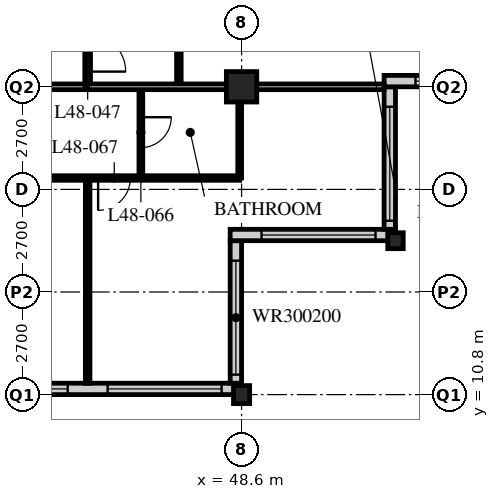
"""IFC4 building model, lengths in metres.
Left out: names, types, materials, properties, quantities, classifications, styles, units other than length and angle.
Written with IfcOpenShell. Run it as: python <this file> out.ifc"""

import sys

from ifc_helpers import new_model, si_unit, direction, frame, frame_2d, origin, origin_2d, place, context, subcontext, project, spatial, rectangle, hollow_rectangle, i_section, extrude, element, fill, save


model = new_model("IFC4")
c1 = context("Model", 3, precision=1e-05, world=origin(), true_north=direction((0.0, 1.0)))
c2 = subcontext(c1, "Body", "Model", "MODEL_VIEW")
j1 = project(units=[si_unit("LENGTHUNIT", "METRE"), si_unit("PLANEANGLEUNIT", "RADIAN")], contexts=[c1])
p1 = place(None, origin())
s1 = spatial("IfcSite", under=j1, at=p1, CompositionType="ELEMENT")
p2 = place(p1, origin())
s2 = spatial("IfcBuilding", under=s1, at=p2, CompositionType="ELEMENT")
p3 = place(p2, frame((0.0, 0.0, 188.4)))
s3 = spatial("IfcBuildingStorey", under=s2, at=p3, CompositionType="ELEMENT", Elevation=188.4)
p4 = place(p3, frame((48.6, 10.8, 0.0), z_axis=(0.0, 0.0, 1.0), x_axis=(1.0, 0.0, 0.0)))
e1 = element("IfcColumn", 1, at=p4, inside=s3, PredefinedType="COLUMN", context=c2, shape_type="SweptSolid", body=[
    extrude(i_section(OverallWidth=0.424, OverallDepth=0.475, WebThickness=0.048, FlangeThickness=0.077, FilletRadius=0.015, at=origin_2d()), origin(), (0.0, 0.0, 1.0), 3.6),
])
p5 = place(p3, frame((48.6, 18.9, 0.0), z_axis=(0.0, 0.0, 1.0), x_axis=(1.0, 0.0, 0.0)))
e2 = element("IfcColumn", 2, at=p5, inside=s3, PredefinedType="COLUMN", context=c2, shape_type="SweptSolid", body=[
    extrude(hollow_rectangle(XDim=0.8, YDim=0.8, WallThickness=0.08, at=origin_2d()), origin(), (0.0, 0.0, 1.0), 3.6),
])
p6 = place(p3, frame((52.65, 14.85, 0.0), z_axis=(0.0, 0.0, 1.0), x_axis=(1.0, 0.0, 0.0)))
e3 = element("IfcColumn", 3, at=p6, inside=s3, PredefinedType="COLUMN", context=c2, shape_type="SweptSolid", body=[
    extrude(i_section(OverallWidth=0.407, OverallDepth=0.419, WebThickness=0.031, FlangeThickness=0.049, FilletRadius=0.015, at=origin_2d()), origin(), (0.0, 0.0, 1.0), 3.6),
])
p7 = place(p3, frame((8.4, 10.95, 0.0), z_axis=(0.0, 0.0, 1.0), x_axis=(1.0, 0.0, 0.0)))
e4 = element("IfcWall", 4, at=p7, inside=s3, PredefinedType="SOLIDWALL", context=c2, shape_type="SweptSolid", body=[
    extrude(rectangle(XDim=40.2, YDim=0.3, at=frame_2d((20.1, 0.0))), origin(), (0.0, 0.0, 1.0), 3.39),
])
p8 = place(p7, frame((0.225, 0.0, 0.6)))
e5 = element("IfcOpeningElement", 5, at=p8, cuts=e4, PredefinedType="OPENING", context=c2, shape_type="SweptSolid", body=[
    extrude(rectangle(XDim=3.0, YDim=2.4, at=frame_2d((1.5, 1.2))), frame((0.0, 0.16, 0.0), z_axis=(0.0, -1.0, 0.0), x_axis=(1.0, 0.0, 0.0)), (0.0, 0.0, 1.0), 0.32),
])
p9 = place(p7, frame((4.275, 0.0, 0.6)))
e6 = element("IfcOpeningElement", 6, at=p9, cuts=e4, PredefinedType="OPENING", context=c2, shape_type="SweptSolid", body=[
    extrude(rectangle(XDim=3.0, YDim=2.4, at=frame_2d((1.5, 1.2))), frame((0.0, 0.16, 0.0), z_axis=(0.0, -1.0, 0.0), x_axis=(1.0, 0.0, 0.0)), (0.0, 0.0, 1.0), 0.32),
])
p10 = place(p7, frame((8.325, 0.0, 0.6)))
e7 = element("IfcOpeningElement", 7, at=p10, cuts=e4, PredefinedType="OPENING", context=c2, shape_type="SweptSolid", body=[
    extrude(rectangle(XDim=3.0, YDim=2.4, at=frame_2d((1.5, 1.2))), frame((0.0, 0.16, 0.0), z_axis=(0.0, -1.0, 0.0), x_axis=(1.0, 0.0, 0.0)), (0.0, 0.0, 1.0), 0.32),
])
p11 = place(p7, frame((12.375, 0.0, 0.6)))
e8 = element("IfcOpeningElement", 8, at=p11, cuts=e4, PredefinedType="OPENING", context=c2, shape_type="SweptSolid", body=[
    extrude(rectangle(XDim=3.0, YDim=2.4, at=frame_2d((1.5, 1.2))), frame((0.0, 0.16, 0.0), z_axis=(0.0, -1.0, 0.0), x_axis=(1.0, 0.0, 0.0)), (0.0, 0.0, 1.0), 0.32),
])
p12 = place(p7, frame((16.425, 0.0, 0.6)))
e9 = element("IfcOpeningElement", 9, at=p12, cuts=e4, PredefinedType="OPENING", context=c2, shape_type="SweptSolid", body=[
    extrude(rectangle(XDim=3.0, YDim=2.4, at=frame_2d((1.5, 1.2))), frame((0.0, 0.16, 0.0), z_axis=(0.0, -1.0, 0.0), x_axis=(1.0, 0.0, 0.0)), (0.0, 0.0, 1.0), 0.32),
])
p13 = place(p7, frame((20.475, 0.0, 0.6)))
e10 = element("IfcOpeningElement", 10, at=p13, cuts=e4, PredefinedType="OPENING", context=c2, shape_type="SweptSolid", body=[
    extrude(rectangle(XDim=3.0, YDim=2.4, at=frame_2d((1.5, 1.2))), frame((0.0, 0.16, 0.0), z_axis=(0.0, -1.0, 0.0), x_axis=(1.0, 0.0, 0.0)), (0.0, 0.0, 1.0), 0.32),
])
p14 = place(p7, frame((24.525, 0.0, 0.6)))
e11 = element("IfcOpeningElement", 11, at=p14, cuts=e4, PredefinedType="OPENING", context=c2, shape_type="SweptSolid", body=[
    extrude(rectangle(XDim=3.0, YDim=2.4, at=frame_2d((1.5, 1.2))), frame((0.0, 0.16, 0.0), z_axis=(0.0, -1.0, 0.0), x_axis=(1.0, 0.0, 0.0)), (0.0, 0.0, 1.0), 0.32),
])
p15 = place(p7, frame((28.575, 0.0, 0.6)))
e12 = element("IfcOpeningElement", 12, at=p15, cuts=e4, PredefinedType="OPENING", context=c2, shape_type="SweptSolid", body=[
    extrude(rectangle(XDim=3.0, YDim=2.4, at=frame_2d((1.5, 1.2))), frame((0.0, 0.16, 0.0), z_axis=(0.0, -1.0, 0.0), x_axis=(1.0, 0.0, 0.0)), (0.0, 0.0, 1.0), 0.32),
])
p16 = place(p7, frame((32.625, 0.0, 0.6)))
e13 = element("IfcOpeningElement", 13, at=p16, cuts=e4, PredefinedType="OPENING", context=c2, shape_type="SweptSolid", body=[
    extrude(rectangle(XDim=3.0, YDim=2.4, at=frame_2d((1.5, 1.2))), frame((0.0, 0.16, 0.0), z_axis=(0.0, -1.0, 0.0), x_axis=(1.0, 0.0, 0.0)), (0.0, 0.0, 1.0), 0.32),
])
p17 = place(p7, frame((36.675, 0.0, 0.6)))
e14 = element("IfcOpeningElement", 14, at=p17, cuts=e4, PredefinedType="OPENING", context=c2, shape_type="SweptSolid", body=[
    extrude(rectangle(XDim=3.0, YDim=2.4, at=frame_2d((1.5, 1.2))), frame((0.0, 0.16, 0.0), z_axis=(0.0, -1.0, 0.0), x_axis=(1.0, 0.0, 0.0)), (0.0, 0.0, 1.0), 0.32),
])
p18 = place(p3, frame((48.45, 11.1, 0.0), z_axis=(0.0, 0.0, 1.0), x_axis=(0.0, 1.0, 0.0)))
e15 = element("IfcWall", 15, at=p18, inside=s3, PredefinedType="SOLIDWALL", context=c2, shape_type="SweptSolid", body=[
    extrude(rectangle(XDim=3.75, YDim=0.3, at=frame_2d((1.875, 0.0))), origin(), (0.0, 0.0, 1.0), 3.39),
])
p19 = place(p18, frame((0.225, 0.0, 0.6)))
e16 = element("IfcOpeningElement", 16, at=p19, cuts=e15, PredefinedType="OPENING", context=c2, shape_type="SweptSolid", body=[
    extrude(rectangle(XDim=3.0, YDim=2.0, at=frame_2d((1.5, 1.0))), frame((0.0, 0.16, 0.0), z_axis=(0.0, -1.0, 0.0), x_axis=(1.0, 0.0, 0.0)), (0.0, 0.0, 1.0), 0.32),
])
p20 = place(p3, frame((48.3, 15.0, 0.0), z_axis=(0.0, 0.0, 1.0), x_axis=(1.0, 0.0, 0.0)))
e17 = element("IfcWall", 17, at=p20, inside=s3, PredefinedType="SOLIDWALL", context=c2, shape_type="SweptSolid", body=[
    extrude(rectangle(XDim=4.35, YDim=0.3, at=frame_2d((2.175, 0.0))), origin(), (0.0, 0.0, 1.0), 3.39),
])
p21 = place(p20, frame((0.825, 0.0, 0.6)))
e18 = element("IfcOpeningElement", 18, at=p21, cuts=e17, PredefinedType="OPENING", context=c2, shape_type="SweptSolid", body=[
    extrude(rectangle(XDim=3.0, YDim=2.0, at=frame_2d((1.5, 1.0))), frame((0.0, 0.16, 0.0), z_axis=(0.0, -1.0, 0.0), x_axis=(1.0, 0.0, 0.0)), (0.0, 0.0, 1.0), 0.32),
])
p22 = place(p3, frame((52.5, 15.15, 0.0), z_axis=(0.0, 0.0, 1.0), x_axis=(0.0, 1.0, 0.0)))
e19 = element("IfcWall", 19, at=p22, inside=s3, PredefinedType="SOLIDWALL", context=c2, shape_type="SweptSolid", body=[
    extrude(rectangle(XDim=3.75, YDim=0.3, at=frame_2d((1.875, 0.0))), origin(), (0.0, 0.0, 1.0), 3.39),
])
p23 = place(p22, frame((0.225, 0.0, 0.6)))
e20 = element("IfcOpeningElement", 20, at=p23, cuts=e19, PredefinedType="OPENING", context=c2, shape_type="SweptSolid", body=[
    extrude(rectangle(XDim=3.0, YDim=2.0, at=frame_2d((1.5, 1.0))), frame((0.0, 0.16, 0.0), z_axis=(0.0, -1.0, 0.0), x_axis=(1.0, 0.0, 0.0)), (0.0, 0.0, 1.0), 0.32),
])
p24 = place(p3, frame((52.35, 19.05, 0.0), z_axis=(0.0, 0.0, 1.0), x_axis=(1.0, 0.0, 0.0)))
e21 = element("IfcWall", 21, at=p24, inside=s3, PredefinedType="SOLIDWALL", context=c2, shape_type="SweptSolid", body=[
    extrude(rectangle(XDim=4.35, YDim=0.3, at=frame_2d((2.175, 0.0))), origin(), (0.0, 0.0, 1.0), 3.39),
])
p25 = place(p24, frame((0.825, 0.0, 0.6)))
e22 = element("IfcOpeningElement", 22, at=p25, cuts=e21, PredefinedType="OPENING", context=c2, shape_type="SweptSolid", body=[
    extrude(rectangle(XDim=3.0, YDim=2.0, at=frame_2d((1.5, 1.0))), frame((0.0, 0.16, 0.0), z_axis=(0.0, -1.0, 0.0), x_axis=(1.0, 0.0, 0.0)), (0.0, 0.0, 1.0), 0.32),
])
p26 = place(p3, frame((12.15, 18.9, 0.0), z_axis=(0.0, 0.0, 1.0), x_axis=(1.0, 0.0, 0.0)))
e23 = element("IfcWall", 23, at=p26, inside=s3, PredefinedType="PARTITIONING", context=c2, shape_type="SweptSolid", body=[
    extrude(rectangle(XDim=32.4, YDim=0.15, at=frame_2d((16.2, 0.0))), origin(), (0.0, 0.0, 1.0), 2.778),
])
p27 = place(p26, frame((4.95, 0.0, 0.0)))
e24 = element("IfcOpeningElement", 24, at=p27, cuts=e23, PredefinedType="OPENING", context=c2, shape_type="SweptSolid", body=[
    extrude(rectangle(XDim=1.0, YDim=2.1, at=frame_2d((0.5, 1.05))), frame((0.0, 0.085, 0.0), z_axis=(0.0, -1.0, 0.0), x_axis=(1.0, 0.0, 0.0)), (0.0, 0.0, 1.0), 0.17),
])
p28 = place(p26, frame((13.05, 0.0, 0.0)))
e25 = element("IfcOpeningElement", 25, at=p28, cuts=e23, PredefinedType="OPENING", context=c2, shape_type="SweptSolid", body=[
    extrude(rectangle(XDim=1.0, YDim=2.1, at=frame_2d((0.5, 1.05))), frame((0.0, 0.085, 0.0), z_axis=(0.0, -1.0, 0.0), x_axis=(1.0, 0.0, 0.0)), (0.0, 0.0, 1.0), 0.17),
])
p29 = place(p26, frame((21.15, 0.0, 0.0)))
e26 = element("IfcOpeningElement", 26, at=p29, cuts=e23, PredefinedType="OPENING", context=c2, shape_type="SweptSolid", body=[
    extrude(rectangle(XDim=1.0, YDim=2.1, at=frame_2d((0.5, 1.05))), frame((0.0, 0.085, 0.0), z_axis=(0.0, -1.0, 0.0), x_axis=(1.0, 0.0, 0.0)), (0.0, 0.0, 1.0), 0.17),
])
p30 = place(p26, frame((1.525, 0.0, 0.0)))
e27 = element("IfcOpeningElement", 27, at=p30, cuts=e23, PredefinedType="OPENING", context=c2, shape_type="SweptSolid", body=[
    extrude(rectangle(XDim=1.0, YDim=2.1, at=frame_2d((0.5, 1.05))), frame((0.0, 0.085, 0.0), z_axis=(0.0, -1.0, 0.0), x_axis=(1.0, 0.0, 0.0)), (0.0, 0.0, 1.0), 0.17),
])
p31 = place(p26, frame((29.875, 0.0, 0.0)))
e28 = element("IfcOpeningElement", 28, at=p31, cuts=e23, PredefinedType="OPENING", context=c2, shape_type="SweptSolid", body=[
    extrude(rectangle(XDim=1.0, YDim=2.1, at=frame_2d((0.5, 1.05))), frame((0.0, 0.085, 0.0), z_axis=(0.0, -1.0, 0.0), x_axis=(1.0, 0.0, 0.0)), (0.0, 0.0, 1.0), 0.17),
])
p32 = place(p3, frame((44.55, 18.9, 0.0), z_axis=(0.0, 0.0, 1.0), x_axis=(0.0, 1.0, 0.0)))
e29 = element("IfcWall", 29, at=p32, inside=s3, PredefinedType="PARTITIONING", context=c2, shape_type="SweptSolid", body=[
    extrude(rectangle(XDim=28.35, YDim=0.15, at=frame_2d((14.175, 0.0))), origin(), (0.0, 0.0, 1.0), 3.39),
])
p33 = place(p32, frame((0.4, 0.0, 0.0)))
e30 = element("IfcOpeningElement", 30, at=p33, cuts=e29, PredefinedType="OPENING", context=c2, shape_type="SweptSolid", body=[
    extrude(rectangle(XDim=1.0, YDim=2.1, at=frame_2d((0.5, 1.05))), frame((0.0, 0.085, 0.0), z_axis=(0.0, -1.0, 0.0), x_axis=(1.0, 0.0, 0.0)), (0.0, 0.0, 1.0), 0.17),
])
p34 = place(p32, frame((10.45, 0.0, 0.0)))
e31 = element("IfcOpeningElement", 31, at=p34, cuts=e29, PredefinedType="OPENING", context=c2, shape_type="SweptSolid", body=[
    extrude(rectangle(XDim=1.0, YDim=2.1, at=frame_2d((0.5, 1.05))), frame((0.0, 0.085, 0.0), z_axis=(0.0, -1.0, 0.0), x_axis=(1.0, 0.0, 0.0)), (0.0, 0.0, 1.0), 0.17),
])
p35 = place(p32, frame((14.5, 0.0, 0.0)))
e32 = element("IfcOpeningElement", 32, at=p35, cuts=e29, PredefinedType="OPENING", context=c2, shape_type="SweptSolid", body=[
    extrude(rectangle(XDim=1.0, YDim=2.1, at=frame_2d((0.5, 1.05))), frame((0.0, 0.085, 0.0), z_axis=(0.0, -1.0, 0.0), x_axis=(1.0, 0.0, 0.0)), (0.0, 0.0, 1.0), 0.17),
])
p36 = place(p32, frame((16.6, 0.0, 0.0)))
e33 = element("IfcOpeningElement", 33, at=p36, cuts=e29, PredefinedType="OPENING", context=c2, shape_type="SweptSolid", body=[
    extrude(rectangle(XDim=1.0, YDim=2.1, at=frame_2d((0.5, 1.05))), frame((0.0, 0.085, 0.0), z_axis=(0.0, -1.0, 0.0), x_axis=(1.0, 0.0, 0.0)), (0.0, 0.0, 1.0), 0.17),
])
p37 = place(p32, frame((26.65, 0.0, 0.0)))
e34 = element("IfcOpeningElement", 34, at=p37, cuts=e29, PredefinedType="OPENING", context=c2, shape_type="SweptSolid", body=[
    extrude(rectangle(XDim=1.0, YDim=2.1, at=frame_2d((0.5, 1.05))), frame((0.0, 0.085, 0.0), z_axis=(0.0, -1.0, 0.0), x_axis=(1.0, 0.0, 0.0)), (0.0, 0.0, 1.0), 0.17),
])
p38 = place(p3, frame((46.95, 18.9, 0.0), z_axis=(0.0, 0.0, 1.0), x_axis=(0.0, 1.0, 0.0)))
e35 = element("IfcWall", 35, at=p38, inside=s3, PredefinedType="PARTITIONING", context=c2, shape_type="SweptSolid", body=[
    extrude(rectangle(XDim=8.1, YDim=0.12, at=frame_2d((4.05, 0.0))), origin(), (0.0, 0.0, 1.0), 3.39),
])
p39 = place(p38, frame((0.975, 0.0, 0.0)))
e36 = element("IfcOpeningElement", 36, at=p39, cuts=e35, PredefinedType="OPENING", context=c2, shape_type="SweptSolid", body=[
    extrude(rectangle(XDim=0.85, YDim=2.1, at=frame_2d((0.425, 1.05))), frame((0.0, 0.07, 0.0), z_axis=(0.0, -1.0, 0.0), x_axis=(1.0, 0.0, 0.0)), (0.0, 0.0, 1.0), 0.14),
])
p40 = place(p38, frame((4.375, 0.0, 0.0)))
e37 = element("IfcOpeningElement", 37, at=p40, cuts=e35, PredefinedType="OPENING", context=c2, shape_type="SweptSolid", body=[
    extrude(rectangle(XDim=0.85, YDim=2.1, at=frame_2d((0.425, 1.05))), frame((0.0, 0.07, 0.0), z_axis=(0.0, -1.0, 0.0), x_axis=(1.0, 0.0, 0.0)), (0.0, 0.0, 1.0), 0.14),
])
p41 = place(p3, frame((8.15, 16.5, 0.0), z_axis=(0.0, 0.0, 1.0), x_axis=(1.0, 0.0, 0.0)))
e38 = element("IfcWall", 38, at=p41, inside=s3, PredefinedType="PARTITIONING", context=c2, shape_type="SweptSolid", body=[
    extrude(rectangle(XDim=40.4, YDim=0.12, at=frame_2d((20.2, 0.0))), origin(), (0.0, 0.0, 1.0), 3.39),
])
p42 = place(p41, frame((9.025, 0.0, 0.0)))
e39 = element("IfcOpeningElement", 39, at=p42, cuts=e38, PredefinedType="OPENING", context=c2, shape_type="SweptSolid", body=[
    extrude(rectangle(XDim=0.85, YDim=2.1, at=frame_2d((0.425, 1.05))), frame((0.0, 0.07, 0.0), z_axis=(0.0, -1.0, 0.0), x_axis=(1.0, 0.0, 0.0)), (0.0, 0.0, 1.0), 0.14),
])
p43 = place(p41, frame((12.425, 0.0, 0.0)))
e40 = element("IfcOpeningElement", 40, at=p43, cuts=e38, PredefinedType="OPENING", context=c2, shape_type="SweptSolid", body=[
    extrude(rectangle(XDim=0.85, YDim=2.1, at=frame_2d((0.425, 1.05))), frame((0.0, 0.07, 0.0), z_axis=(0.0, -1.0, 0.0), x_axis=(1.0, 0.0, 0.0)), (0.0, 0.0, 1.0), 0.14),
])
p44 = place(p41, frame((17.125, 0.0, 0.0)))
e41 = element("IfcOpeningElement", 41, at=p44, cuts=e38, PredefinedType="OPENING", context=c2, shape_type="SweptSolid", body=[
    extrude(rectangle(XDim=0.85, YDim=2.1, at=frame_2d((0.425, 1.05))), frame((0.0, 0.07, 0.0), z_axis=(0.0, -1.0, 0.0), x_axis=(1.0, 0.0, 0.0)), (0.0, 0.0, 1.0), 0.14),
])
p45 = place(p41, frame((20.525, 0.0, 0.0)))
e42 = element("IfcOpeningElement", 42, at=p45, cuts=e38, PredefinedType="OPENING", context=c2, shape_type="SweptSolid", body=[
    extrude(rectangle(XDim=0.85, YDim=2.1, at=frame_2d((0.425, 1.05))), frame((0.0, 0.07, 0.0), z_axis=(0.0, -1.0, 0.0), x_axis=(1.0, 0.0, 0.0)), (0.0, 0.0, 1.0), 0.14),
])
p46 = place(p41, frame((25.225, 0.0, 0.0)))
e43 = element("IfcOpeningElement", 43, at=p46, cuts=e38, PredefinedType="OPENING", context=c2, shape_type="SweptSolid", body=[
    extrude(rectangle(XDim=0.85, YDim=2.1, at=frame_2d((0.425, 1.05))), frame((0.0, 0.07, 0.0), z_axis=(0.0, -1.0, 0.0), x_axis=(1.0, 0.0, 0.0)), (0.0, 0.0, 1.0), 0.14),
])
p47 = place(p41, frame((28.625, 0.0, 0.0)))
e44 = element("IfcOpeningElement", 44, at=p47, cuts=e38, PredefinedType="OPENING", context=c2, shape_type="SweptSolid", body=[
    extrude(rectangle(XDim=0.85, YDim=2.1, at=frame_2d((0.425, 1.05))), frame((0.0, 0.07, 0.0), z_axis=(0.0, -1.0, 0.0), x_axis=(1.0, 0.0, 0.0)), (0.0, 0.0, 1.0), 0.14),
])
p48 = place(p41, frame((6.725, 0.0, 0.0)))
e45 = element("IfcOpeningElement", 45, at=p48, cuts=e38, PredefinedType="OPENING", context=c2, shape_type="SweptSolid", body=[
    extrude(rectangle(XDim=0.85, YDim=2.1, at=frame_2d((0.425, 1.05))), frame((0.0, 0.07, 0.0), z_axis=(0.0, -1.0, 0.0), x_axis=(1.0, 0.0, 0.0)), (0.0, 0.0, 1.0), 0.14),
])
p49 = place(p41, frame((2.875, 0.0, 0.0)))
e46 = element("IfcOpeningElement", 46, at=p49, cuts=e38, PredefinedType="OPENING", context=c2, shape_type="SweptSolid", body=[
    extrude(rectangle(XDim=0.85, YDim=2.1, at=frame_2d((0.425, 1.05))), frame((0.0, 0.07, 0.0), z_axis=(0.0, -1.0, 0.0), x_axis=(1.0, 0.0, 0.0)), (0.0, 0.0, 1.0), 0.14),
])
p50 = place(p41, frame((32.825, 0.0, 0.0)))
e47 = element("IfcOpeningElement", 47, at=p50, cuts=e38, PredefinedType="OPENING", context=c2, shape_type="SweptSolid", body=[
    extrude(rectangle(XDim=0.85, YDim=2.1, at=frame_2d((0.425, 1.05))), frame((0.0, 0.07, 0.0), z_axis=(0.0, -1.0, 0.0), x_axis=(1.0, 0.0, 0.0)), (0.0, 0.0, 1.0), 0.14),
])
p51 = place(p41, frame((36.675, 0.0, 0.0)))
e48 = element("IfcOpeningElement", 48, at=p51, cuts=e38, PredefinedType="OPENING", context=c2, shape_type="SweptSolid", body=[
    extrude(rectangle(XDim=0.85, YDim=2.1, at=frame_2d((0.425, 1.05))), frame((0.0, 0.07, 0.0), z_axis=(0.0, -1.0, 0.0), x_axis=(1.0, 0.0, 0.0)), (0.0, 0.0, 1.0), 0.14),
])
p52 = place(p3, frame((45.95, 18.9, 0.0), z_axis=(0.0, 0.0, 1.0), x_axis=(0.0, -1.0, 0.0)))
e49 = element("IfcWall", 49, at=p52, inside=s3, PredefinedType="PARTITIONING", context=c2, shape_type="SweptSolid", body=[
    extrude(rectangle(XDim=2.4, YDim=0.1, at=frame_2d((1.2, 0.0))), origin(), (0.0, 0.0, 1.0), 3.39),
])
p53 = place(p52, frame((0.8, 0.0, 0.0)))
e50 = element("IfcOpeningElement", 50, at=p53, cuts=e49, PredefinedType="OPENING", context=c2, shape_type="SweptSolid", body=[
    extrude(rectangle(XDim=0.8, YDim=2.1, at=frame_2d((0.4, 1.05))), frame((0.0, 0.06, 0.0), z_axis=(0.0, -1.0, 0.0), x_axis=(1.0, 0.0, 0.0)), (0.0, 0.0, 1.0), 0.12),
])
p54 = place(p3, frame((48.55, 18.9, 0.0), z_axis=(0.0, 0.0, 1.0), x_axis=(0.0, -1.0, 0.0)))
e51 = element("IfcWall", 51, at=p54, inside=s3, PredefinedType="PARTITIONING", context=c2, shape_type="SweptSolid", body=[
    extrude(rectangle(XDim=2.4, YDim=0.1, at=frame_2d((1.2, 0.0))), origin(), (0.0, 0.0, 1.0), 2.778),
])
p55 = place(p3, frame((44.55, 16.5, 0.0), z_axis=(0.0, 0.0, 1.0), x_axis=(0.0, -1.0, 0.0)))
e52 = element("IfcWall", 52, at=p55, inside=s3, PredefinedType="PARTITIONING", context=c2, shape_type="SweptSolid", body=[
    extrude(rectangle(XDim=5.4, YDim=0.12, at=frame_2d((2.7, 0.0))), origin(), (0.0, 0.0, 1.0), 3.39),
])
p56 = place(p3, frame((44.55, 18.9, 0.0), z_axis=(0.0, 0.0, 1.0), x_axis=(1.0, 0.0, 0.0)))
e53 = element("IfcWall", 53, at=p56, inside=s3, PredefinedType="PARTITIONING", context=c2, shape_type="SweptSolid", body=[
    extrude(rectangle(XDim=7.8, YDim=0.15, at=frame_2d((3.9, 0.0))), origin(), (0.0, 0.0, 1.0), 2.778),
])
p57 = place(p16, origin())
e54 = element("IfcWindow", 54, at=p57, inside=s3, PartitioningType="SINGLE_PANEL", PredefinedType="WINDOW", context=c2, shape_type="SweptSolid", body=[
    extrude(rectangle(XDim=3.0, YDim=2.4, at=frame_2d((1.5, 1.2))), frame((0.0, 0.03, 0.0), z_axis=(0.0, -1.0, 0.0), x_axis=(1.0, 0.0, 0.0)), (0.0, 0.0, 1.0), 0.06),
])
fill(e13, e54)
p58 = place(p17, origin())
e55 = element("IfcWindow", 55, at=p58, inside=s3, PartitioningType="SINGLE_PANEL", PredefinedType="WINDOW", context=c2, shape_type="SweptSolid", body=[
    extrude(rectangle(XDim=3.0, YDim=2.4, at=frame_2d((1.5, 1.2))), frame((0.0, 0.03, 0.0), z_axis=(0.0, -1.0, 0.0), x_axis=(1.0, 0.0, 0.0)), (0.0, 0.0, 1.0), 0.06),
])
fill(e14, e55)
p59 = place(p19, origin())
e56 = element("IfcWindow", 56, at=p59, inside=s3, PartitioningType="SINGLE_PANEL", PredefinedType="WINDOW", context=c2, shape_type="SweptSolid", body=[
    extrude(rectangle(XDim=3.0, YDim=2.0, at=frame_2d((1.5, 1.0))), frame((0.0, 0.03, 0.0), z_axis=(0.0, -1.0, 0.0), x_axis=(1.0, 0.0, 0.0)), (0.0, 0.0, 1.0), 0.06),
])
fill(e16, e56)
p60 = place(p21, origin())
e57 = element("IfcWindow", 57, at=p60, inside=s3, PartitioningType="SINGLE_PANEL", PredefinedType="WINDOW", context=c2, shape_type="SweptSolid", body=[
    extrude(rectangle(XDim=3.0, YDim=2.0, at=frame_2d((1.5, 1.0))), frame((0.0, 0.03, 0.0), z_axis=(0.0, -1.0, 0.0), x_axis=(1.0, 0.0, 0.0)), (0.0, 0.0, 1.0), 0.06),
])
fill(e18, e57)
p61 = place(p23, origin())
e58 = element("IfcWindow", 58, at=p61, inside=s3, PartitioningType="SINGLE_PANEL", PredefinedType="WINDOW", context=c2, shape_type="SweptSolid", body=[
    extrude(rectangle(XDim=3.0, YDim=2.0, at=frame_2d((1.5, 1.0))), frame((0.0, 0.03, 0.0), z_axis=(0.0, -1.0, 0.0), x_axis=(1.0, 0.0, 0.0)), (0.0, 0.0, 1.0), 0.06),
])
fill(e20, e58)
p62 = place(p25, origin())
e59 = element("IfcWindow", 59, at=p62, inside=s3, PartitioningType="SINGLE_PANEL", PredefinedType="WINDOW", context=c2, shape_type="SweptSolid", body=[
    extrude(rectangle(XDim=3.0, YDim=2.0, at=frame_2d((1.5, 1.0))), frame((0.0, 0.03, 0.0), z_axis=(0.0, -1.0, 0.0), x_axis=(1.0, 0.0, 0.0)), (0.0, 0.0, 1.0), 0.06),
])
fill(e22, e59)
p63 = place(p33, origin())
e60 = element("IfcDoor", 60, at=p63, inside=s3, OperationType="SINGLE_SWING_RIGHT", PredefinedType="DOOR", context=c2, shape_type="SweptSolid", body=[
    extrude(rectangle(XDim=1.0, YDim=2.1, at=frame_2d((0.5, 1.05))), frame((0.0, 0.025, 0.0), z_axis=(0.0, -1.0, 0.0), x_axis=(1.0, 0.0, 0.0)), (0.0, 0.0, 1.0), 0.05),
])
fill(e30, e60)
p64 = place(p53, origin())
e61 = element("IfcDoor", 61, at=p64, inside=s3, OperationType="SINGLE_SWING_LEFT", PredefinedType="DOOR", context=c2, shape_type="SweptSolid", body=[
    extrude(rectangle(XDim=0.8, YDim=2.1, at=frame_2d((0.4, 1.05))), frame((0.0, 0.025, 0.0), z_axis=(0.0, -1.0, 0.0), x_axis=(1.0, 0.0, 0.0)), (0.0, 0.0, 1.0), 0.05),
])
fill(e50, e61)
p65 = place(p51, origin())
e62 = element("IfcDoor", 62, at=p65, inside=s3, OperationType="SINGLE_SWING_RIGHT", PredefinedType="DOOR", context=c2, shape_type="SweptSolid", body=[
    extrude(rectangle(XDim=0.85, YDim=2.1, at=frame_2d((0.425, 1.05))), frame((0.0, 0.025, 0.0), z_axis=(0.0, -1.0, 0.0), x_axis=(1.0, 0.0, 0.0)), (0.0, 0.0, 1.0), 0.05),
])
fill(e48, e62)
save(model, sys.argv[1])
